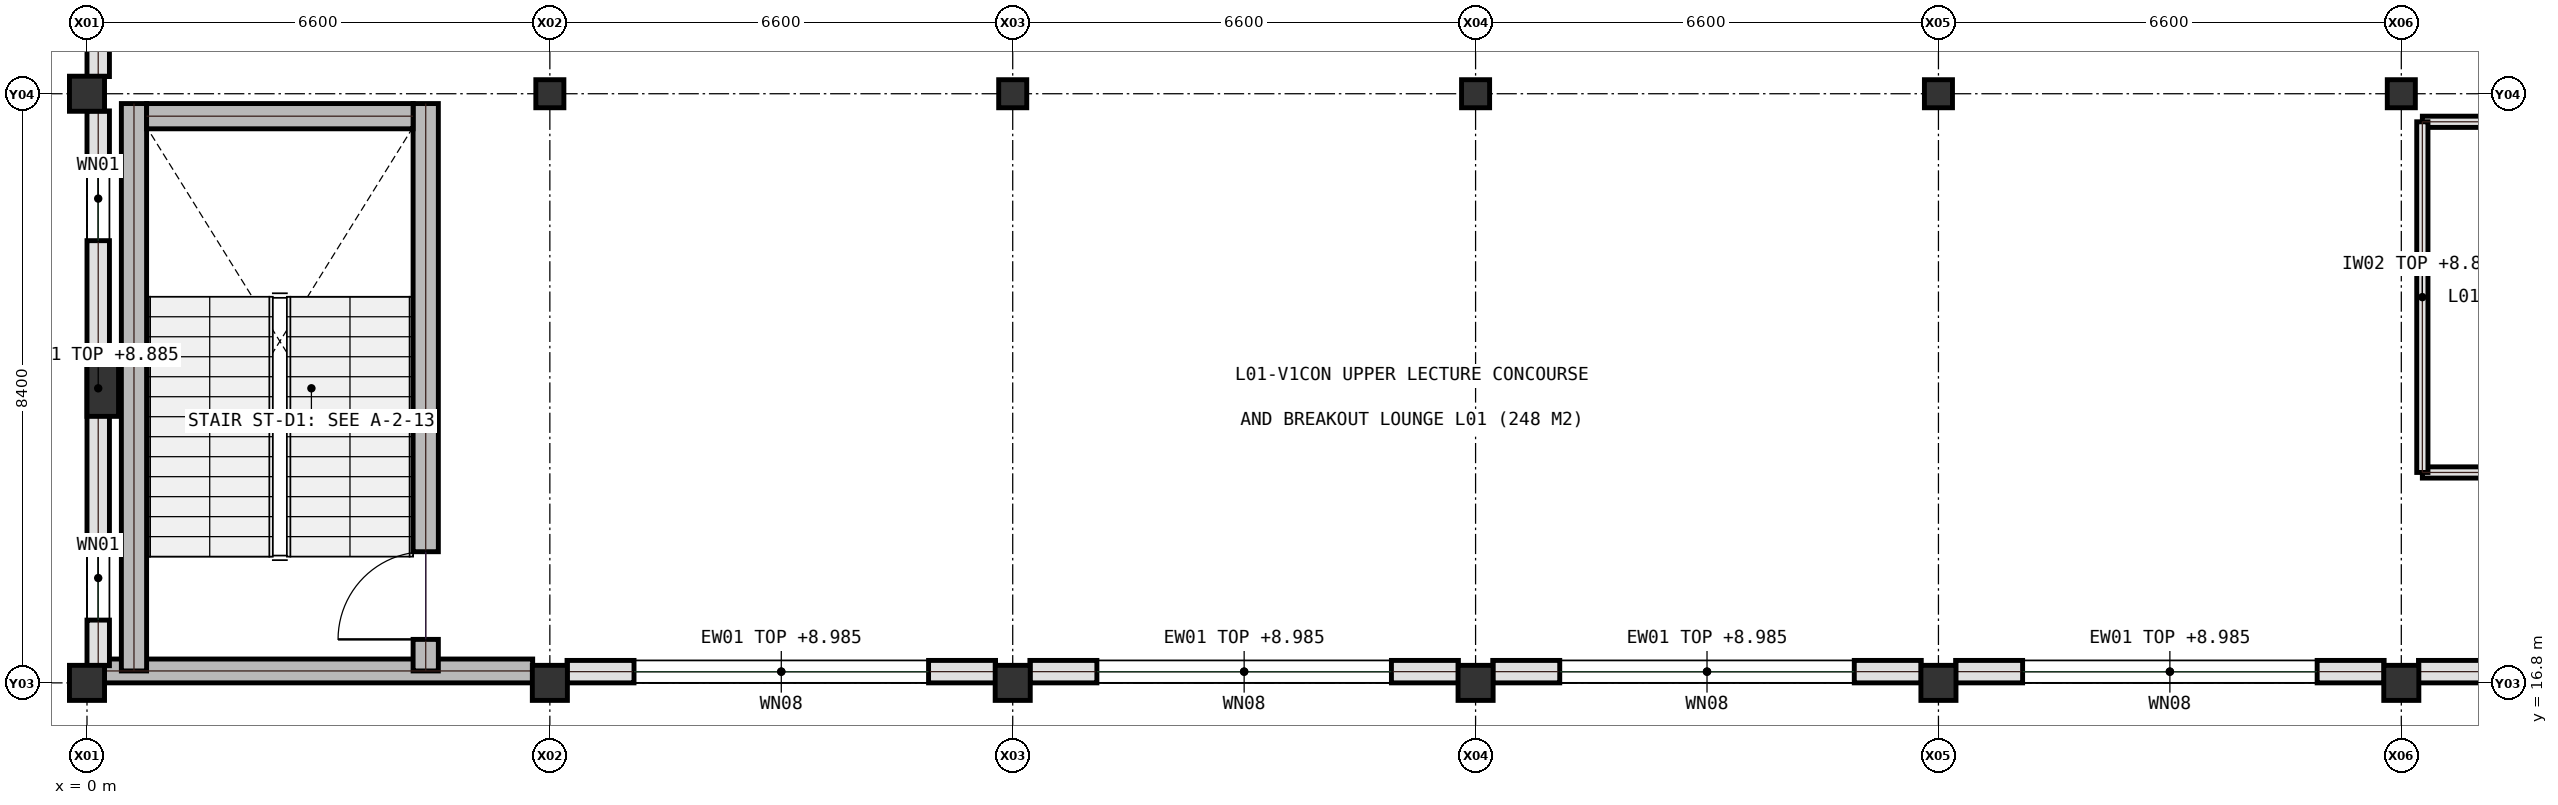
"""IFC4 building model, lengths in metres.
Left out: names, types, materials, properties, quantities, classifications, styles, units other than length and angle.
Written with IfcOpenShell. Run it as: python <this file> out.ifc"""

import sys

from ifc_helpers import new_model, si_unit, direction, frame, frame_2d, origin, origin_2d, place, context, subcontext, project, spatial, rectangle, extrude, element, fill, save


model = new_model("IFC4")
c1 = context("Model", 3, precision=1e-05, world=origin(), true_north=direction((0.0, 1.0)))
c2 = subcontext(c1, "Body", "Model", "MODEL_VIEW")
j1 = project(units=[si_unit("LENGTHUNIT", "METRE"), si_unit("PLANEANGLEUNIT", "RADIAN")], contexts=[c1])
p1 = place(None, origin())
s1 = spatial("IfcSite", under=j1, at=p1, CompositionType="ELEMENT")
p2 = place(p1, origin())
s2 = spatial("IfcBuilding", under=s1, at=p2, CompositionType="ELEMENT")
p3 = place(p2, frame((0.0, 0.0, 5.4)))
s3 = spatial("IfcBuildingStorey", under=s2, at=p3, CompositionType="ELEMENT", Elevation=5.4)
for number, where, z_axis, x_axis in (
    (1, (0.0, 16.8, 0.0), (0.0, 0.0, 1.0), (1.0, 0.0, 0.0)),
    (2, (0.0, 25.2, 0.0), (0.0, 0.0, 1.0), (1.0, 0.0, 0.0)),
    (3, (6.6, 16.8, 0.0), (0.0, 0.0, 1.0), (1.0, 0.0, 0.0)),
):
    element("IfcColumn", number, at=place(p3, frame(where, z_axis=z_axis, x_axis=x_axis)), inside=s3, PredefinedType="COLUMN", context=c2, shape_type="SweptSolid", body=[
        extrude(rectangle(XDim=0.5, YDim=0.5, at=origin_2d()), origin(), (0.0, 0.0, 1.0), 4.5),
    ])
p4 = place(p3, frame((6.6, 25.2, 0.0), z_axis=(0.0, 0.0, 1.0), x_axis=(1.0, 0.0, 0.0)))
e4 = element("IfcColumn", 4, at=p4, inside=s3, PredefinedType="COLUMN", context=c2, shape_type="SweptSolid", body=[
    extrude(rectangle(XDim=0.4, YDim=0.4, at=origin_2d()), origin(), (0.0, 0.0, 1.0), 4.5),
])
p5 = place(p3, frame((13.2, 16.8, 0.0), z_axis=(0.0, 0.0, 1.0), x_axis=(1.0, 0.0, 0.0)))
e5 = element("IfcColumn", 5, at=p5, inside=s3, PredefinedType="COLUMN", context=c2, shape_type="SweptSolid", body=[
    extrude(rectangle(XDim=0.5, YDim=0.5, at=origin_2d()), origin(), (0.0, 0.0, 1.0), 4.5),
])
p6 = place(p3, frame((13.2, 25.2, 0.0), z_axis=(0.0, 0.0, 1.0), x_axis=(1.0, 0.0, 0.0)))
e6 = element("IfcColumn", 6, at=p6, inside=s3, PredefinedType="COLUMN", context=c2, shape_type="SweptSolid", body=[
    extrude(rectangle(XDim=0.4, YDim=0.4, at=origin_2d()), origin(), (0.0, 0.0, 1.0), 4.5),
])
p7 = place(p3, frame((19.8, 16.8, 0.0), z_axis=(0.0, 0.0, 1.0), x_axis=(1.0, 0.0, 0.0)))
e7 = element("IfcColumn", 7, at=p7, inside=s3, PredefinedType="COLUMN", context=c2, shape_type="SweptSolid", body=[
    extrude(rectangle(XDim=0.5, YDim=0.5, at=origin_2d()), origin(), (0.0, 0.0, 1.0), 4.5),
])
p8 = place(p3, frame((19.8, 25.2, 0.0), z_axis=(0.0, 0.0, 1.0), x_axis=(1.0, 0.0, 0.0)))
e8 = element("IfcColumn", 8, at=p8, inside=s3, PredefinedType="COLUMN", context=c2, shape_type="SweptSolid", body=[
    extrude(rectangle(XDim=0.4, YDim=0.4, at=origin_2d()), origin(), (0.0, 0.0, 1.0), 4.5),
])
p9 = place(p3, frame((26.4, 16.8, 0.0), z_axis=(0.0, 0.0, 1.0), x_axis=(1.0, 0.0, 0.0)))
e9 = element("IfcColumn", 9, at=p9, inside=s3, PredefinedType="COLUMN", context=c2, shape_type="SweptSolid", body=[
    extrude(rectangle(XDim=0.5, YDim=0.5, at=origin_2d()), origin(), (0.0, 0.0, 1.0), 4.5),
])
p10 = place(p3, frame((26.4, 25.2, 0.0), z_axis=(0.0, 0.0, 1.0), x_axis=(1.0, 0.0, 0.0)))
e10 = element("IfcColumn", 10, at=p10, inside=s3, PredefinedType="COLUMN", context=c2, shape_type="SweptSolid", body=[
    extrude(rectangle(XDim=0.4, YDim=0.4, at=origin_2d()), origin(), (0.0, 0.0, 1.0), 4.5),
])
p11 = place(p3, frame((33.0, 16.8, 0.0), z_axis=(0.0, 0.0, 1.0), x_axis=(1.0, 0.0, 0.0)))
e11 = element("IfcColumn", 11, at=p11, inside=s3, PredefinedType="COLUMN", context=c2, shape_type="SweptSolid", body=[
    extrude(rectangle(XDim=0.5, YDim=0.5, at=origin_2d()), origin(), (0.0, 0.0, 1.0), 4.5),
])
p12 = place(p3, frame((33.0, 25.2, 0.0), z_axis=(0.0, 0.0, 1.0), x_axis=(1.0, 0.0, 0.0)))
e12 = element("IfcColumn", 12, at=p12, inside=s3, PredefinedType="COLUMN", context=c2, shape_type="SweptSolid", body=[
    extrude(rectangle(XDim=0.4, YDim=0.4, at=origin_2d()), origin(), (0.0, 0.0, 1.0), 4.5),
])
p13 = place(p3, frame((0.225, 21.0, 0.0), z_axis=(0.0, 0.0, 1.0), x_axis=(1.0, 0.0, 0.0)))
e13 = element("IfcColumn", 13, at=p13, inside=s3, PredefinedType="PILASTER", context=c2, shape_type="SweptSolid", body=[
    extrude(rectangle(XDim=0.45, YDim=0.8, at=origin_2d()), origin(), (0.0, 0.0, 1.0), 4.5),
])
p14 = place(p3, frame((33.3, 19.8, 0.0), z_axis=(0.0, 0.0, 1.0), x_axis=(1.0, 0.0, 0.0)))
e14 = element("IfcWall", 14, at=p14, inside=s3, PredefinedType="PARTITIONING", context=c2, shape_type="SweptSolid", body=[
    extrude(rectangle(XDim=12.65, YDim=0.16, at=frame_2d((6.325, 0.0))), origin(), (0.0, 0.0, 1.0), 3.45),
])
p15 = place(p14, frame((2.2, 0.0, 0.0)))
e15 = element("IfcOpeningElement", 15, at=p15, cuts=e14, PredefinedType="OPENING", context=c2, shape_type="SweptSolid", body=[
    extrude(rectangle(XDim=1.05, YDim=2.15, at=frame_2d((0.525, 1.075))), frame((0.0, 0.09, 0.0), z_axis=(0.0, -1.0, 0.0), x_axis=(1.0, 0.0, 0.0)), (0.0, 0.0, 1.0), 0.18),
])
p16 = place(p14, frame((7.0, 0.0, 0.0)))
e16 = element("IfcOpeningElement", 16, at=p16, cuts=e14, PredefinedType="OPENING", context=c2, shape_type="SweptSolid", body=[
    extrude(rectangle(XDim=1.05, YDim=2.15, at=frame_2d((0.525, 1.075))), frame((0.0, 0.09, 0.0), z_axis=(0.0, -1.0, 0.0), x_axis=(1.0, 0.0, 0.0)), (0.0, 0.0, 1.0), 0.18),
])
p17 = place(p14, frame((11.1, 0.0, 0.0)))
e17 = element("IfcOpeningElement", 17, at=p17, cuts=e14, PredefinedType="OPENING", context=c2, shape_type="SweptSolid", body=[
    extrude(rectangle(XDim=1.05, YDim=2.15, at=frame_2d((0.525, 1.075))), frame((0.0, 0.09, 0.0), z_axis=(0.0, -1.0, 0.0), x_axis=(1.0, 0.0, 0.0)), (0.0, 0.0, 1.0), 0.18),
])
p18 = place(p3, frame((33.3, 24.8, 0.0), z_axis=(0.0, 0.0, 1.0), x_axis=(1.0, 0.0, 0.0)))
e18 = element("IfcWall", 18, at=p18, inside=s3, PredefinedType="PARTITIONING", context=c2, shape_type="SweptSolid", body=[
    extrude(rectangle(XDim=5.85, YDim=0.16, at=frame_2d((2.925, 0.0))), origin(), (0.0, 0.0, 1.0), 3.45),
])
p19 = place(p3, frame((33.3, 19.8, 0.0), z_axis=(0.0, 0.0, 1.0), x_axis=(0.0, 1.0, 0.0)))
e19 = element("IfcWall", 19, at=p19, inside=s3, PredefinedType="PARTITIONING", context=c2, shape_type="SweptSolid", body=[
    extrude(rectangle(XDim=5.0, YDim=0.16, at=frame_2d((2.5, 0.0))), origin(), (0.0, 0.0, 1.0), 3.45),
])
p20 = place(p3, frame((0.245, 16.97, 0.0), z_axis=(0.0, 0.0, 1.0), x_axis=(1.0, 0.0, 0.0)))
e20 = element("IfcWall", 20, at=p20, inside=s3, PredefinedType="SHEAR", context=c2, shape_type="SweptSolid", body=[
    extrude(rectangle(XDim=6.11, YDim=0.34, at=frame_2d((3.055, 0.0))), origin(), (0.0, 0.0, 1.0), 4.2),
])
p21 = place(p3, frame((0.16, 24.955, 0.0), z_axis=(0.0, 0.0, 1.0), x_axis=(0.0, -1.0, 0.0)))
e21 = element("IfcWall", 21, at=p21, inside=s3, PredefinedType="SOLIDWALL", context=c2, shape_type="SweptSolid", body=[
    extrude(rectangle(XDim=7.91, YDim=0.32, at=frame_2d((3.955, 0.0))), origin(), (0.0, 0.0, 1.0), 3.485),
])
p22 = place(p21, frame((0.65, 0.0, 0.95)))
e22 = element("IfcOpeningElement", 22, at=p22, cuts=e21, PredefinedType="OPENING", context=c2, shape_type="SweptSolid", body=[
    extrude(rectangle(XDim=1.2, YDim=1.5, at=frame_2d((0.6, 0.75))), frame((0.0, 0.17, 0.0), z_axis=(0.0, -1.0, 0.0), x_axis=(1.0, 0.0, 0.0)), (0.0, 0.0, 1.0), 0.34),
])
p23 = place(p21, frame((6.06, 0.0, 0.95)))
e23 = element("IfcOpeningElement", 23, at=p23, cuts=e21, PredefinedType="OPENING", context=c2, shape_type="SweptSolid", body=[
    extrude(rectangle(XDim=1.2, YDim=1.5, at=frame_2d((0.6, 0.75))), frame((0.0, 0.17, 0.0), z_axis=(0.0, -1.0, 0.0), x_axis=(1.0, 0.0, 0.0)), (0.0, 0.0, 1.0), 0.34),
])
p24 = place(p3, frame((0.16, 33.355, 0.0), z_axis=(0.0, 0.0, 1.0), x_axis=(0.0, -1.0, 0.0)))
e24 = element("IfcWall", 24, at=p24, inside=s3, PredefinedType="SOLIDWALL", context=c2, shape_type="SweptSolid", body=[
    extrude(rectangle(XDim=7.91, YDim=0.32, at=frame_2d((3.955, 0.0))), origin(), (0.0, 0.0, 1.0), 3.635),
])
p25 = place(p24, frame((1.855, 0.0, 1.45)))
e25 = element("IfcOpeningElement", 25, at=p25, cuts=e24, PredefinedType="OPENING", context=c2, shape_type="SweptSolid", body=[
    extrude(rectangle(XDim=4.2, YDim=1.1, at=frame_2d((2.1, 0.55))), frame((0.0, 0.17, 0.0), z_axis=(0.0, -1.0, 0.0), x_axis=(1.0, 0.0, 0.0)), (0.0, 0.0, 1.0), 0.34),
])
p26 = place(p3, frame((6.845, 16.96, 0.0), z_axis=(0.0, 0.0, 1.0), x_axis=(1.0, 0.0, 0.0)))
e26 = element("IfcWall", 26, at=p26, inside=s3, PredefinedType="SOLIDWALL", context=c2, shape_type="SweptSolid", body=[
    extrude(rectangle(XDim=6.11, YDim=0.32, at=frame_2d((3.055, 0.0))), origin(), (0.0, 0.0, 1.0), 3.585),
])
p27 = place(p26, frame((0.955, 0.0, 1.45)))
e27 = element("IfcOpeningElement", 27, at=p27, cuts=e26, PredefinedType="OPENING", context=c2, shape_type="SweptSolid", body=[
    extrude(rectangle(XDim=4.2, YDim=1.1, at=frame_2d((2.1, 0.55))), frame((0.0, 0.17, 0.0), z_axis=(0.0, -1.0, 0.0), x_axis=(1.0, 0.0, 0.0)), (0.0, 0.0, 1.0), 0.34),
])
p28 = place(p3, frame((13.445, 16.96, 0.0), z_axis=(0.0, 0.0, 1.0), x_axis=(1.0, 0.0, 0.0)))
e28 = element("IfcWall", 28, at=p28, inside=s3, PredefinedType="SOLIDWALL", context=c2, shape_type="SweptSolid", body=[
    extrude(rectangle(XDim=6.11, YDim=0.32, at=frame_2d((3.055, 0.0))), origin(), (0.0, 0.0, 1.0), 3.585),
])
p29 = place(p28, frame((0.955, 0.0, 1.45)))
e29 = element("IfcOpeningElement", 29, at=p29, cuts=e28, PredefinedType="OPENING", context=c2, shape_type="SweptSolid", body=[
    extrude(rectangle(XDim=4.2, YDim=1.1, at=frame_2d((2.1, 0.55))), frame((0.0, 0.17, 0.0), z_axis=(0.0, -1.0, 0.0), x_axis=(1.0, 0.0, 0.0)), (0.0, 0.0, 1.0), 0.34),
])
p30 = place(p3, frame((20.045, 16.96, 0.0), z_axis=(0.0, 0.0, 1.0), x_axis=(1.0, 0.0, 0.0)))
e30 = element("IfcWall", 30, at=p30, inside=s3, PredefinedType="SOLIDWALL", context=c2, shape_type="SweptSolid", body=[
    extrude(rectangle(XDim=6.11, YDim=0.32, at=frame_2d((3.055, 0.0))), origin(), (0.0, 0.0, 1.0), 3.585),
])
p31 = place(p30, frame((0.955, 0.0, 1.45)))
e31 = element("IfcOpeningElement", 31, at=p31, cuts=e30, PredefinedType="OPENING", context=c2, shape_type="SweptSolid", body=[
    extrude(rectangle(XDim=4.2, YDim=1.1, at=frame_2d((2.1, 0.55))), frame((0.0, 0.17, 0.0), z_axis=(0.0, -1.0, 0.0), x_axis=(1.0, 0.0, 0.0)), (0.0, 0.0, 1.0), 0.34),
])
p32 = place(p3, frame((26.645, 16.96, 0.0), z_axis=(0.0, 0.0, 1.0), x_axis=(1.0, 0.0, 0.0)))
e32 = element("IfcWall", 32, at=p32, inside=s3, PredefinedType="SOLIDWALL", context=c2, shape_type="SweptSolid", body=[
    extrude(rectangle(XDim=6.11, YDim=0.32, at=frame_2d((3.055, 0.0))), origin(), (0.0, 0.0, 1.0), 3.585),
])
p33 = place(p32, frame((0.955, 0.0, 1.45)))
e33 = element("IfcOpeningElement", 33, at=p33, cuts=e32, PredefinedType="OPENING", context=c2, shape_type="SweptSolid", body=[
    extrude(rectangle(XDim=4.2, YDim=1.1, at=frame_2d((2.1, 0.55))), frame((0.0, 0.17, 0.0), z_axis=(0.0, -1.0, 0.0), x_axis=(1.0, 0.0, 0.0)), (0.0, 0.0, 1.0), 0.34),
])
p34 = place(p3, frame((33.245, 16.96, 0.0), z_axis=(0.0, 0.0, 1.0), x_axis=(1.0, 0.0, 0.0)))
e34 = element("IfcWall", 34, at=p34, inside=s3, PredefinedType="SOLIDWALL", context=c2, shape_type="SweptSolid", body=[
    extrude(rectangle(XDim=6.11, YDim=0.32, at=frame_2d((3.055, 0.0))), origin(), (0.0, 0.0, 1.0), 3.585),
])
p35 = place(p34, frame((0.955, 0.0, 1.45)))
e35 = element("IfcOpeningElement", 35, at=p35, cuts=e34, PredefinedType="OPENING", context=c2, shape_type="SweptSolid", body=[
    extrude(rectangle(XDim=4.2, YDim=1.1, at=frame_2d((2.1, 0.55))), frame((0.0, 0.17, 0.0), z_axis=(0.0, -1.0, 0.0), x_axis=(1.0, 0.0, 0.0)), (0.0, 0.0, 1.0), 0.34),
])
p36 = place(p3, frame((0.67, 16.97, 0.0), z_axis=(0.0, 0.0, 1.0), x_axis=(0.0, 1.0, 0.0)))
e36 = element("IfcWall", 36, at=p36, inside=s3, PredefinedType="SHEAR", context=c2, shape_type="SweptSolid", body=[
    extrude(rectangle(XDim=8.09, YDim=0.36, at=frame_2d((4.045, 0.0))), origin(), (0.0, 0.0, 1.0), 4.2),
])
p37 = place(p3, frame((4.83, 16.97, 0.0), z_axis=(0.0, 0.0, 1.0), x_axis=(0.0, 1.0, 0.0)))
e37 = element("IfcWall", 37, at=p37, inside=s3, PredefinedType="SHEAR", context=c2, shape_type="SweptSolid", body=[
    extrude(rectangle(XDim=8.09, YDim=0.36, at=frame_2d((4.045, 0.0))), origin(), (0.0, 0.0, 1.0), 4.2),
])
p38 = place(p37, frame((0.45, 0.0, 0.0)))
e38 = element("IfcOpeningElement", 38, at=p38, cuts=e37, PredefinedType="OPENING", context=c2, shape_type="SweptSolid", body=[
    extrude(rectangle(XDim=1.25, YDim=2.15, at=frame_2d((0.625, 1.075))), frame((0.0, 0.19, 0.0), z_axis=(0.0, -1.0, 0.0), x_axis=(1.0, 0.0, 0.0)), (0.0, 0.0, 1.0), 0.38),
])
p39 = place(p3, frame((0.85, 24.88, 0.0), z_axis=(0.0, 0.0, 1.0), x_axis=(1.0, 0.0, 0.0)))
e39 = element("IfcWall", 39, at=p39, inside=s3, PredefinedType="SHEAR", context=c2, shape_type="SweptSolid", body=[
    extrude(rectangle(XDim=3.8, YDim=0.36, at=frame_2d((1.9, 0.0))), origin(), (0.0, 0.0, 1.0), 4.2),
])
p40 = place(p22, origin())
e40 = element("IfcWindow", 40, at=p40, inside=s3, PartitioningType="SINGLE_PANEL", PredefinedType="WINDOW", context=c2, shape_type="SweptSolid", body=[
    extrude(rectangle(XDim=1.2, YDim=1.5, at=frame_2d((0.6, 0.75))), frame((0.0, 0.03, 0.0), z_axis=(0.0, -1.0, 0.0), x_axis=(1.0, 0.0, 0.0)), (0.0, 0.0, 1.0), 0.06),
])
fill(e22, e40)
p41 = place(p23, origin())
e41 = element("IfcWindow", 41, at=p41, inside=s3, PartitioningType="SINGLE_PANEL", PredefinedType="WINDOW", context=c2, shape_type="SweptSolid", body=[
    extrude(rectangle(XDim=1.2, YDim=1.5, at=frame_2d((0.6, 0.75))), frame((0.0, 0.03, 0.0), z_axis=(0.0, -1.0, 0.0), x_axis=(1.0, 0.0, 0.0)), (0.0, 0.0, 1.0), 0.06),
])
fill(e23, e41)
p42 = place(p27, origin())
e42 = element("IfcWindow", 42, at=p42, inside=s3, PartitioningType="SINGLE_PANEL", PredefinedType="WINDOW", context=c2, shape_type="SweptSolid", body=[
    extrude(rectangle(XDim=4.2, YDim=1.1, at=frame_2d((2.1, 0.55))), frame((0.0, 0.03, 0.0), z_axis=(0.0, -1.0, 0.0), x_axis=(1.0, 0.0, 0.0)), (0.0, 0.0, 1.0), 0.06),
])
fill(e27, e42)
p43 = place(p29, origin())
e43 = element("IfcWindow", 43, at=p43, inside=s3, PartitioningType="SINGLE_PANEL", PredefinedType="WINDOW", context=c2, shape_type="SweptSolid", body=[
    extrude(rectangle(XDim=4.2, YDim=1.1, at=frame_2d((2.1, 0.55))), frame((0.0, 0.03, 0.0), z_axis=(0.0, -1.0, 0.0), x_axis=(1.0, 0.0, 0.0)), (0.0, 0.0, 1.0), 0.06),
])
fill(e29, e43)
p44 = place(p31, origin())
e44 = element("IfcWindow", 44, at=p44, inside=s3, PartitioningType="SINGLE_PANEL", PredefinedType="WINDOW", context=c2, shape_type="SweptSolid", body=[
    extrude(rectangle(XDim=4.2, YDim=1.1, at=frame_2d((2.1, 0.55))), frame((0.0, 0.03, 0.0), z_axis=(0.0, -1.0, 0.0), x_axis=(1.0, 0.0, 0.0)), (0.0, 0.0, 1.0), 0.06),
])
fill(e31, e44)
p45 = place(p33, origin())
e45 = element("IfcWindow", 45, at=p45, inside=s3, PartitioningType="SINGLE_PANEL", PredefinedType="WINDOW", context=c2, shape_type="SweptSolid", body=[
    extrude(rectangle(XDim=4.2, YDim=1.1, at=frame_2d((2.1, 0.55))), frame((0.0, 0.03, 0.0), z_axis=(0.0, -1.0, 0.0), x_axis=(1.0, 0.0, 0.0)), (0.0, 0.0, 1.0), 0.06),
])
fill(e33, e45)
p46 = place(p38, origin())
e46 = element("IfcDoor", 46, at=p46, inside=s3, OperationType="SINGLE_SWING_LEFT", PredefinedType="DOOR", context=c2, shape_type="SweptSolid", body=[
    extrude(rectangle(XDim=1.25, YDim=2.15, at=frame_2d((0.625, 1.075))), frame((0.0, 0.025, 0.0), z_axis=(0.0, -1.0, 0.0), x_axis=(1.0, 0.0, 0.0)), (0.0, 0.0, 1.0), 0.05),
])
fill(e38, e46)
save(model, sys.argv[1])
